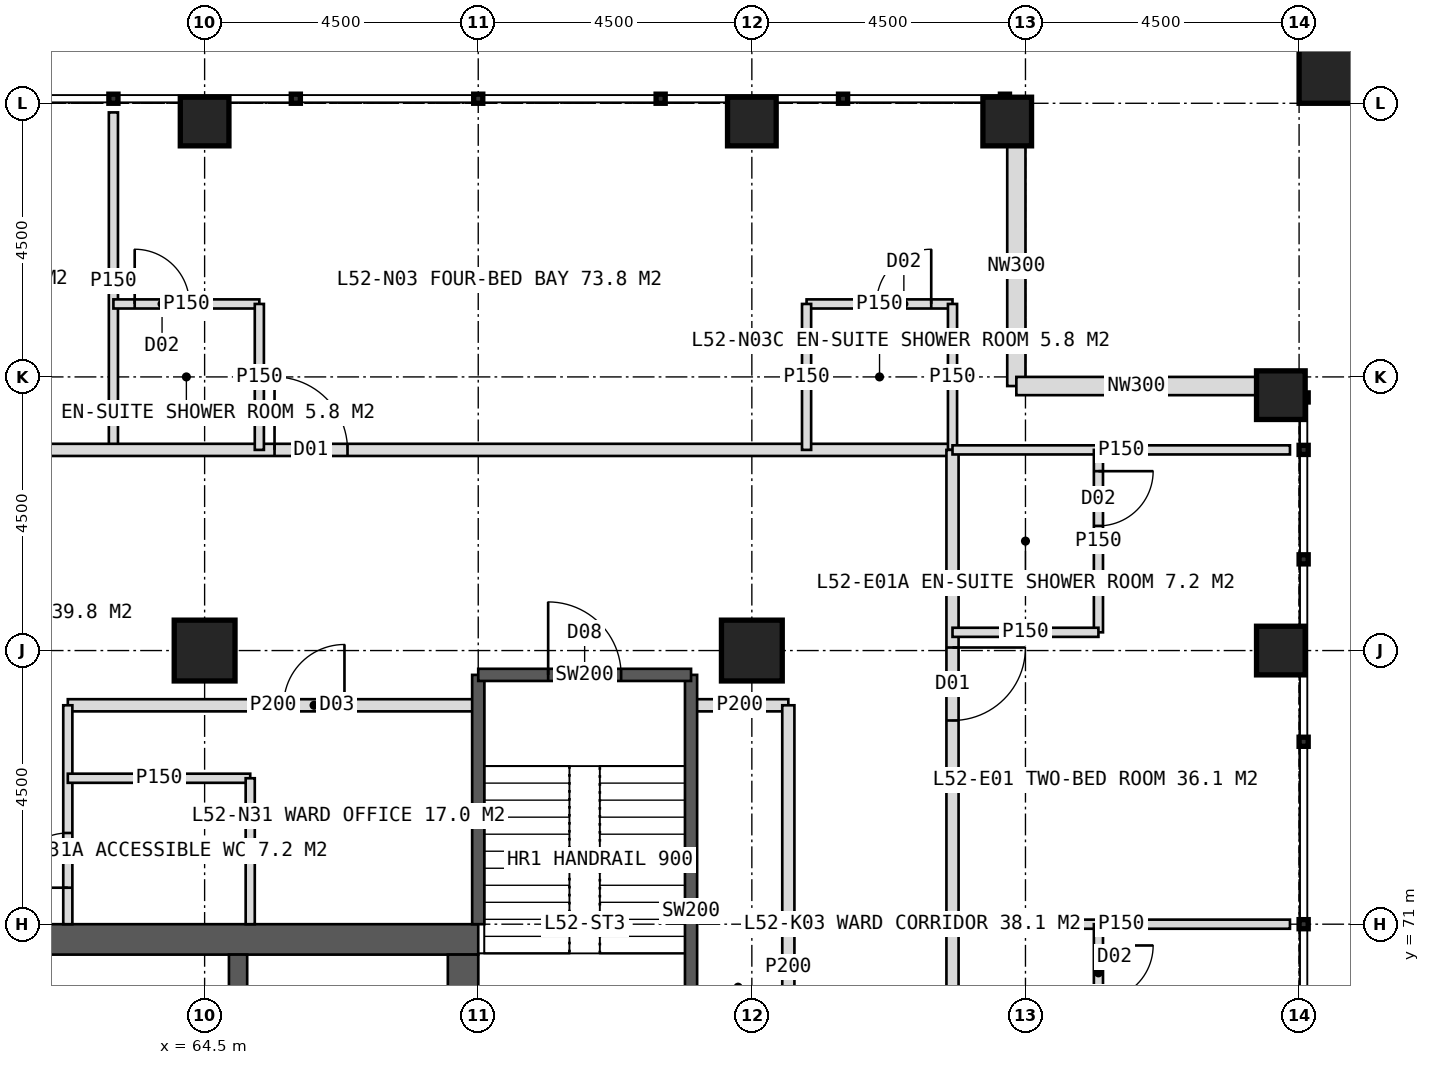
"""IFC4 building model, lengths in metres.
Left out: names, types, materials, properties, quantities, classifications, styles, units other than length and angle.
Written with IfcOpenShell. Run it as: python <this file> out.ifc"""

import sys

from ifc_helpers import new_model, si_unit, direction, frame, frame_2d, origin, origin_2d, place, context, subcontext, project, spatial, rectangle, hollow_rectangle, extrude, element, fill, save


model = new_model("IFC4")
c1 = context("Model", 3, precision=1e-05, world=origin(), true_north=direction((0.0, 1.0)))
c2 = subcontext(c1, "Body", "Model", "MODEL_VIEW")
j1 = project(units=[si_unit("LENGTHUNIT", "METRE"), si_unit("PLANEANGLEUNIT", "RADIAN")], contexts=[c1])
p1 = place(None, origin())
s1 = spatial("IfcSite", under=j1, at=p1, CompositionType="ELEMENT")
p2 = place(p1, origin())
s2 = spatial("IfcBuilding", under=s1, at=p2, CompositionType="ELEMENT")
p3 = place(p2, frame((0.0, 0.0, 217.0)))
s3 = spatial("IfcBuildingStorey", under=s2, at=p3, CompositionType="ELEMENT", Elevation=217.0)
p4 = place(p3, frame((51.0, 70.75, 0.0), z_axis=(0.0, 0.0, 1.0), x_axis=(1.0, 0.0, 0.0)))
e1 = element("IfcWall", 1, at=p4, inside=s3, PredefinedType="SHEAR", context=c2, shape_type="SweptSolid", body=[
    extrude(rectangle(XDim=18.0, YDim=0.5, at=frame_2d((9.0, 0.0))), origin(), (0.0, 0.0, 1.0), 4.0),
])
p5 = place(p4, frame((8.1, 0.0, 0.0)))
e2 = element("IfcOpeningElement", 2, at=p5, cuts=e1, PredefinedType="OPENING", context=c2, shape_type="SweptSolid", body=[
    extrude(rectangle(XDim=1.8, YDim=2.2, at=frame_2d((0.9, 1.1))), frame((0.0, 0.26, 0.0), z_axis=(0.0, -1.0, 0.0), x_axis=(1.0, 0.0, 0.0)), (0.0, 0.0, 1.0), 0.52),
])
p6 = place(p3, frame((68.75, 53.5, 0.0), z_axis=(0.0, 0.0, 1.0), x_axis=(0.0, 1.0, 0.0)))
e3 = element("IfcWall", 3, at=p6, inside=s3, PredefinedType="SHEAR", context=c2, shape_type="SweptSolid", body=[
    extrude(rectangle(XDim=17.0, YDim=0.5, at=frame_2d((8.5, 0.0))), origin(), (0.0, 0.0, 1.0), 4.0),
])
p7 = place(p6, frame((9.6, 0.0, 0.0)))
e4 = element("IfcOpeningElement", 4, at=p7, cuts=e3, PredefinedType="OPENING", context=c2, shape_type="SweptSolid", body=[
    extrude(rectangle(XDim=1.5, YDim=2.2, at=frame_2d((0.75, 1.1))), frame((0.0, 0.26, 0.0), z_axis=(0.0, -1.0, 0.0), x_axis=(1.0, 0.0, 0.0)), (0.0, 0.0, 1.0), 0.52),
])
p8 = place(p3, frame((65.05, 53.5, 0.0), z_axis=(0.0, 0.0, 1.0), x_axis=(0.0, 1.0, 0.0)))
e5 = element("IfcWall", 5, at=p8, inside=s3, PredefinedType="SHEAR", context=c2, shape_type="SweptSolid", body=[
    extrude(rectangle(XDim=17.0, YDim=0.3, at=frame_2d((8.5, 0.0))), origin(), (0.0, 0.0, 1.0), 4.0),
])
for number, where, z_axis, x_axis in (
    (6, (73.5, 75.5, 0.0), (0.0, 0.0, 1.0), (1.0, 0.0, 0.0)),
    (7, (64.5, 75.5, 0.0), (0.0, 0.0, 1.0), (1.0, 0.0, 0.0)),
):
    element("IfcColumn", number, at=place(p3, frame(where, z_axis=z_axis, x_axis=x_axis)), inside=s3, PredefinedType="COLUMN", context=c2, shape_type="SweptSolid", body=[
        extrude(hollow_rectangle(XDim=1.0, YDim=1.0, WallThickness=0.1, at=origin_2d()), origin(), (0.0, 0.0, 1.0), 4.0),
    ])
for number, where, z_axis, x_axis in (
    (8, (64.5, 84.2, 0.0), (0.0, 0.0, 1.0), (1.0, 0.0, 0.0)),
    (9, (73.5, 84.2, 0.0), (0.0, 0.0, 1.0), (1.0, 0.0, 0.0)),
    (10, (82.2, 75.5, 0.0), (0.0, 0.0, 1.0), (1.0, 0.0, 0.0)),
    (11, (77.7, 84.2, 0.0), (0.0, 0.0, 1.0), (1.0, 0.0, 0.0)),
    (12, (82.2, 79.7, 0.0), (0.0, 0.0, 1.0), (1.0, 0.0, 0.0)),
):
    element("IfcColumn", number, at=place(p3, frame(where, z_axis=z_axis, x_axis=x_axis)), inside=s3, PredefinedType="COLUMN", context=c2, shape_type="SweptSolid", body=[
        extrude(hollow_rectangle(XDim=0.8, YDim=0.8, WallThickness=0.08, at=origin_2d()), origin(), (0.0, 0.0, 1.0), 4.0),
    ])
p9 = place(p3, frame((83.1, 85.1, 0.0), z_axis=(0.0, 0.0, 1.0), x_axis=(1.0, 0.0, 0.0)))
e13 = element("IfcColumn", 13, at=p9, inside=s3, PredefinedType="COLUMN", context=c2, shape_type="SweptSolid", body=[
    extrude(hollow_rectangle(XDim=1.2, YDim=1.2, WallThickness=0.07, at=origin_2d()), origin(), (0.0, 0.0, 1.0), 4.0),
])
for number, where, z_axis, x_axis in (
    (14, (77.85, 83.8, 0.0), (0.0, 0.0, 1.0), (0.0, -1.0, 0.0)),
    (15, (77.85, 79.85, 0.0), (0.0, 0.0, 1.0), (1.0, 0.0, 0.0)),
):
    element("IfcWall", number, at=place(p3, frame(where, z_axis=z_axis, x_axis=x_axis)), inside=s3, PredefinedType="ELEMENTEDWALL", context=c2, shape_type="SweptSolid", body=[
        extrude(rectangle(XDim=3.95, YDim=0.3, at=frame_2d((1.975, 0.0))), origin(), (0.0, 0.0, 1.0), 2.85),
    ])
p10 = place(p3, frame((63.0, 78.8, 0.0), z_axis=(0.0, 0.0, 1.0), x_axis=(0.0, 1.0, 0.0)))
e16 = element("IfcWall", 16, at=p10, inside=s3, PredefinedType="PARTITIONING", context=c2, shape_type="SweptSolid", body=[
    extrude(rectangle(XDim=5.55, YDim=0.15, at=frame_2d((2.775, 0.0))), origin(), (0.0, 0.0, 1.0), 3.75),
])
p11 = place(p3, frame((43.2, 78.8, 0.0), z_axis=(0.0, 0.0, 1.0), x_axis=(1.0, 0.0, 0.0)))
e17 = element("IfcWall", 17, at=p11, inside=s3, PredefinedType="PARTITIONING", context=c2, shape_type="SweptSolid", body=[
    extrude(rectangle(XDim=33.6, YDim=0.2, at=frame_2d((16.8, 0.0))), origin(), (0.0, 0.0, 1.0), 3.75),
])
p12 = place(p11, frame((4.9, 0.0, 0.0)))
e18 = element("IfcOpeningElement", 18, at=p12, cuts=e17, PredefinedType="OPENING", context=c2, shape_type="SweptSolid", body=[
    extrude(rectangle(XDim=1.0, YDim=2.1, at=frame_2d((0.5, 1.05))), frame((0.0, 0.11, 0.0), z_axis=(0.0, -1.0, 0.0), x_axis=(1.0, 0.0, 0.0)), (0.0, 0.0, 1.0), 0.22),
])
p13 = place(p11, frame((14.05, 0.0, 0.0)))
e19 = element("IfcOpeningElement", 19, at=p13, cuts=e17, PredefinedType="OPENING", context=c2, shape_type="SweptSolid", body=[
    extrude(rectangle(XDim=1.2, YDim=2.2, at=frame_2d((0.6, 1.1))), frame((0.0, 0.11, 0.0), z_axis=(0.0, -1.0, 0.0), x_axis=(1.0, 0.0, 0.0)), (0.0, 0.0, 1.0), 0.22),
])
p14 = place(p11, frame((22.45, 0.0, 0.0)))
e20 = element("IfcOpeningElement", 20, at=p14, cuts=e17, PredefinedType="OPENING", context=c2, shape_type="SweptSolid", body=[
    extrude(rectangle(XDim=1.2, YDim=2.2, at=frame_2d((0.6, 1.1))), frame((0.0, 0.11, 0.0), z_axis=(0.0, -1.0, 0.0), x_axis=(1.0, 0.0, 0.0)), (0.0, 0.0, 1.0), 0.22),
])
p15 = place(p3, frame((63.0, 81.2, 0.0), z_axis=(0.0, 0.0, 1.0), x_axis=(1.0, 0.0, 0.0)))
e21 = element("IfcWall", 21, at=p15, inside=s3, PredefinedType="PARTITIONING", context=c2, shape_type="SweptSolid", body=[
    extrude(rectangle(XDim=2.4, YDim=0.15, at=frame_2d((1.2, 0.0))), origin(), (0.0, 0.0, 1.0), 3.75),
])
p16 = place(p15, frame((0.35, 0.0, 0.0)))
e22 = element("IfcOpeningElement", 22, at=p16, cuts=e21, PredefinedType="OPENING", context=c2, shape_type="SweptSolid", body=[
    extrude(rectangle(XDim=0.9, YDim=2.1, at=frame_2d((0.45, 1.05))), frame((0.0, 0.085, 0.0), z_axis=(0.0, -1.0, 0.0), x_axis=(1.0, 0.0, 0.0)), (0.0, 0.0, 1.0), 0.17),
])
p17 = place(p3, frame((65.4, 78.8, 0.0), z_axis=(0.0, 0.0, 1.0), x_axis=(0.0, 1.0, 0.0)))
e23 = element("IfcWall", 23, at=p17, inside=s3, PredefinedType="PARTITIONING", context=c2, shape_type="SweptSolid", body=[
    extrude(rectangle(XDim=2.4, YDim=0.15, at=frame_2d((1.2, 0.0))), origin(), (0.0, 0.0, 1.0), 3.75),
])
p18 = place(p3, frame((74.4, 81.2, 0.0), z_axis=(0.0, 0.0, 1.0), x_axis=(1.0, 0.0, 0.0)))
e24 = element("IfcWall", 24, at=p18, inside=s3, PredefinedType="PARTITIONING", context=c2, shape_type="SweptSolid", body=[
    extrude(rectangle(XDim=2.4, YDim=0.15, at=frame_2d((1.2, 0.0))), origin(), (0.0, 0.0, 1.0), 3.75),
])
p19 = place(p18, frame((1.15, 0.0, 0.0)))
e25 = element("IfcOpeningElement", 25, at=p19, cuts=e24, PredefinedType="OPENING", context=c2, shape_type="SweptSolid", body=[
    extrude(rectangle(XDim=0.9, YDim=2.1, at=frame_2d((0.45, 1.05))), frame((0.0, 0.085, 0.0), z_axis=(0.0, -1.0, 0.0), x_axis=(1.0, 0.0, 0.0)), (0.0, 0.0, 1.0), 0.17),
])
for number, where, z_axis, x_axis in (
    (26, (74.4, 78.8, 0.0), (0.0, 0.0, 1.0), (0.0, 1.0, 0.0)),
    (27, (76.8, 78.8, 0.0), (0.0, 0.0, 1.0), (0.0, 1.0, 0.0)),
):
    element("IfcWall", number, at=place(p3, frame(where, z_axis=z_axis, x_axis=x_axis)), inside=s3, PredefinedType="PARTITIONING", context=c2, shape_type="SweptSolid", body=[
        extrude(rectangle(XDim=2.4, YDim=0.15, at=frame_2d((1.2, 0.0))), origin(), (0.0, 0.0, 1.0), 3.75),
    ])
p20 = place(p3, frame((62.25, 74.6, 0.0), z_axis=(0.0, 0.0, 1.0), x_axis=(1.0, 0.0, 0.0)))
e28 = element("IfcWall", 28, at=p20, inside=s3, PredefinedType="PARTITIONING", context=c2, shape_type="SweptSolid", body=[
    extrude(rectangle(XDim=6.75, YDim=0.2, at=frame_2d((3.375, 0.0))), origin(), (0.0, 0.0, 1.0), 3.75),
])
p21 = place(p20, frame((3.55, 0.0, 0.0)))
e29 = element("IfcOpeningElement", 29, at=p21, cuts=e28, PredefinedType="OPENING", context=c2, shape_type="SweptSolid", body=[
    extrude(rectangle(XDim=1.0, YDim=2.1, at=frame_2d((0.5, 1.05))), frame((0.0, 0.11, 0.0), z_axis=(0.0, -1.0, 0.0), x_axis=(1.0, 0.0, 0.0)), (0.0, 0.0, 1.0), 0.22),
])
p22 = place(p3, frame((72.5, 74.6, 0.0), z_axis=(0.0, 0.0, 1.0), x_axis=(1.0, 0.0, 0.0)))
e30 = element("IfcWall", 30, at=p22, inside=s3, PredefinedType="PARTITIONING", context=c2, shape_type="SweptSolid", body=[
    extrude(rectangle(XDim=1.6, YDim=0.2, at=frame_2d((0.8, 0.0))), origin(), (0.0, 0.0, 1.0), 3.75),
])
p23 = place(p3, frame((62.25, 71.0, 0.0), z_axis=(0.0, 0.0, 1.0), x_axis=(0.0, 1.0, 0.0)))
e31 = element("IfcWall", 31, at=p23, inside=s3, PredefinedType="PARTITIONING", context=c2, shape_type="SweptSolid", body=[
    extrude(rectangle(XDim=3.6, YDim=0.15, at=frame_2d((1.8, 0.0))), origin(), (0.0, 0.0, 1.0), 3.75),
])
p24 = place(p23, frame((0.6, 0.0, 0.0)))
e32 = element("IfcOpeningElement", 32, at=p24, cuts=e31, PredefinedType="OPENING", context=c2, shape_type="SweptSolid", body=[
    extrude(rectangle(XDim=0.9, YDim=2.1, at=frame_2d((0.45, 1.05))), frame((0.0, 0.085, 0.0), z_axis=(0.0, -1.0, 0.0), x_axis=(1.0, 0.0, 0.0)), (0.0, 0.0, 1.0), 0.17),
])
p25 = place(p3, frame((62.25, 73.4, 0.0), z_axis=(0.0, 0.0, 1.0), x_axis=(1.0, 0.0, 0.0)))
e33 = element("IfcWall", 33, at=p25, inside=s3, PredefinedType="PARTITIONING", context=c2, shape_type="SweptSolid", body=[
    extrude(rectangle(XDim=3.0, YDim=0.15, at=frame_2d((1.5, 0.0))), origin(), (0.0, 0.0, 1.0), 3.75),
])
p26 = place(p3, frame((65.25, 71.0, 0.0), z_axis=(0.0, 0.0, 1.0), x_axis=(0.0, 1.0, 0.0)))
e34 = element("IfcWall", 34, at=p26, inside=s3, PredefinedType="PARTITIONING", context=c2, shape_type="SweptSolid", body=[
    extrude(rectangle(XDim=2.4, YDim=0.15, at=frame_2d((1.2, 0.0))), origin(), (0.0, 0.0, 1.0), 3.75),
])
p27 = place(p3, frame((76.8, 71.0, 0.0), z_axis=(0.0, 0.0, 1.0), x_axis=(1.0, 0.0, 0.0)))
e35 = element("IfcWall", 35, at=p27, inside=s3, PredefinedType="PARTITIONING", context=c2, shape_type="SweptSolid", body=[
    extrude(rectangle(XDim=5.55, YDim=0.15, at=frame_2d((2.775, 0.0))), origin(), (0.0, 0.0, 1.0), 3.75),
])
p28 = place(p3, frame((76.8, 78.8, 0.0), z_axis=(0.0, 0.0, 1.0), x_axis=(0.0, -1.0, 0.0)))
e36 = element("IfcWall", 36, at=p28, inside=s3, PredefinedType="PARTITIONING", context=c2, shape_type="SweptSolid", body=[
    extrude(rectangle(XDim=33.6, YDim=0.2, at=frame_2d((16.8, 0.0))), origin(), (0.0, 0.0, 1.0), 3.75),
])
p29 = place(p28, frame((3.25, 0.0, 0.0)))
e37 = element("IfcOpeningElement", 37, at=p29, cuts=e36, PredefinedType="OPENING", context=c2, shape_type="SweptSolid", body=[
    extrude(rectangle(XDim=1.2, YDim=2.2, at=frame_2d((0.6, 1.1))), frame((0.0, 0.11, 0.0), z_axis=(0.0, -1.0, 0.0), x_axis=(1.0, 0.0, 0.0)), (0.0, 0.0, 1.0), 0.22),
])
p30 = place(p28, frame((10.45, 0.0, 0.0)))
e38 = element("IfcOpeningElement", 38, at=p30, cuts=e36, PredefinedType="OPENING", context=c2, shape_type="SweptSolid", body=[
    extrude(rectangle(XDim=1.2, YDim=2.2, at=frame_2d((0.6, 1.1))), frame((0.0, 0.11, 0.0), z_axis=(0.0, -1.0, 0.0), x_axis=(1.0, 0.0, 0.0)), (0.0, 0.0, 1.0), 0.22),
])
p31 = place(p28, frame((14.8, 0.0, 0.0)))
e39 = element("IfcOpeningElement", 39, at=p31, cuts=e36, PredefinedType="OPENING", context=c2, shape_type="SweptSolid", body=[
    extrude(rectangle(XDim=1.0, YDim=2.1, at=frame_2d((0.5, 1.05))), frame((0.0, 0.11, 0.0), z_axis=(0.0, -1.0, 0.0), x_axis=(1.0, 0.0, 0.0)), (0.0, 0.0, 1.0), 0.22),
])
p32 = place(p28, frame((20.05, 0.0, 0.0)))
e40 = element("IfcOpeningElement", 40, at=p32, cuts=e36, PredefinedType="OPENING", context=c2, shape_type="SweptSolid", body=[
    extrude(rectangle(XDim=1.2, YDim=2.2, at=frame_2d((0.6, 1.1))), frame((0.0, 0.11, 0.0), z_axis=(0.0, -1.0, 0.0), x_axis=(1.0, 0.0, 0.0)), (0.0, 0.0, 1.0), 0.22),
])
p33 = place(p28, frame((26.95, 0.0, 0.0)))
e41 = element("IfcOpeningElement", 41, at=p33, cuts=e36, PredefinedType="OPENING", context=c2, shape_type="SweptSolid", body=[
    extrude(rectangle(XDim=1.2, YDim=2.2, at=frame_2d((0.6, 1.1))), frame((0.0, 0.11, 0.0), z_axis=(0.0, -1.0, 0.0), x_axis=(1.0, 0.0, 0.0)), (0.0, 0.0, 1.0), 0.22),
])
p34 = place(p3, frame((76.8, 78.8, 0.0), z_axis=(0.0, 0.0, 1.0), x_axis=(1.0, 0.0, 0.0)))
e42 = element("IfcWall", 42, at=p34, inside=s3, PredefinedType="PARTITIONING", context=c2, shape_type="SweptSolid", body=[
    extrude(rectangle(XDim=5.55, YDim=0.15, at=frame_2d((2.775, 0.0))), origin(), (0.0, 0.0, 1.0), 3.75),
])
p35 = place(p3, frame((79.2, 78.8, 0.0), z_axis=(0.0, 0.0, 1.0), x_axis=(0.0, -1.0, 0.0)))
e43 = element("IfcWall", 43, at=p35, inside=s3, PredefinedType="PARTITIONING", context=c2, shape_type="SweptSolid", body=[
    extrude(rectangle(XDim=3.0, YDim=0.15, at=frame_2d((1.5, 0.0))), origin(), (0.0, 0.0, 1.0), 3.75),
])
p36 = place(p35, frame((0.35, 0.0, 0.0)))
e44 = element("IfcOpeningElement", 44, at=p36, cuts=e43, PredefinedType="OPENING", context=c2, shape_type="SweptSolid", body=[
    extrude(rectangle(XDim=0.9, YDim=2.1, at=frame_2d((0.45, 1.05))), frame((0.0, 0.085, 0.0), z_axis=(0.0, -1.0, 0.0), x_axis=(1.0, 0.0, 0.0)), (0.0, 0.0, 1.0), 0.17),
])
p37 = place(p3, frame((76.8, 75.8, 0.0), z_axis=(0.0, 0.0, 1.0), x_axis=(1.0, 0.0, 0.0)))
e45 = element("IfcWall", 45, at=p37, inside=s3, PredefinedType="PARTITIONING", context=c2, shape_type="SweptSolid", body=[
    extrude(rectangle(XDim=2.4, YDim=0.15, at=frame_2d((1.2, 0.0))), origin(), (0.0, 0.0, 1.0), 3.75),
])
p38 = place(p3, frame((79.2, 71.0, 0.0), z_axis=(0.0, 0.0, 1.0), x_axis=(0.0, -1.0, 0.0)))
e46 = element("IfcWall", 46, at=p38, inside=s3, PredefinedType="PARTITIONING", context=c2, shape_type="SweptSolid", body=[
    extrude(rectangle(XDim=2.4, YDim=0.15, at=frame_2d((1.2, 0.0))), origin(), (0.0, 0.0, 1.0), 3.75),
])
p39 = place(p38, frame((0.35, 0.0, 0.0)))
e47 = element("IfcOpeningElement", 47, at=p39, cuts=e46, PredefinedType="OPENING", context=c2, shape_type="SweptSolid", body=[
    extrude(rectangle(XDim=0.9, YDim=2.1, at=frame_2d((0.45, 1.05))), frame((0.0, 0.085, 0.0), z_axis=(0.0, -1.0, 0.0), x_axis=(1.0, 0.0, 0.0)), (0.0, 0.0, 1.0), 0.17),
])
p40 = place(p3, frame((74.1, 74.6, 0.0), z_axis=(0.0, 0.0, 1.0), x_axis=(0.0, -1.0, 0.0)))
e48 = element("IfcWall", 48, at=p40, inside=s3, PredefinedType="PARTITIONING", context=c2, shape_type="SweptSolid", body=[
    extrude(rectangle(XDim=8.6, YDim=0.2, at=frame_2d((4.3, 0.0))), origin(), (0.0, 0.0, 1.0), 3.75),
])
p41 = place(p40, frame((5.6, 0.0, 0.0)))
e49 = element("IfcOpeningElement", 49, at=p41, cuts=e48, PredefinedType="OPENING", context=c2, shape_type="SweptSolid", body=[
    extrude(rectangle(XDim=1.0, YDim=2.1, at=frame_2d((0.5, 1.05))), frame((0.0, 0.11, 0.0), z_axis=(0.0, -1.0, 0.0), x_axis=(1.0, 0.0, 0.0)), (0.0, 0.0, 1.0), 0.22),
])
p42 = place(p3, frame((69.0, 71.0, 0.0), z_axis=(0.0, 0.0, 1.0), x_axis=(0.0, 1.0, 0.0)))
e50 = element("IfcWall", 50, at=p42, inside=s3, PredefinedType="SOLIDWALL", context=c2, shape_type="SweptSolid", body=[
    extrude(rectangle(XDim=4.1, YDim=0.2, at=frame_2d((2.05, 0.0))), origin(), (0.0, 0.0, 1.0), 3.75),
])
p43 = place(p3, frame((72.5, 67.35, 0.0), z_axis=(0.0, 0.0, 1.0), x_axis=(0.0, 1.0, 0.0)))
e51 = element("IfcWall", 51, at=p43, inside=s3, PredefinedType="SOLIDWALL", context=c2, shape_type="SweptSolid", body=[
    extrude(rectangle(XDim=7.75, YDim=0.2, at=frame_2d((3.875, 0.0))), origin(), (0.0, 0.0, 1.0), 3.75),
])
p44 = place(p3, frame((69.0, 75.1, 0.0), z_axis=(0.0, 0.0, 1.0), x_axis=(1.0, 0.0, 0.0)))
e52 = element("IfcWall", 52, at=p44, inside=s3, PredefinedType="SOLIDWALL", context=c2, shape_type="SweptSolid", body=[
    extrude(rectangle(XDim=3.5, YDim=0.2, at=frame_2d((1.75, 0.0))), origin(), (0.0, 0.0, 1.0), 3.75),
])
p45 = place(p44, frame((1.15, 0.0, 0.0)))
e53 = element("IfcOpeningElement", 53, at=p45, cuts=e52, PredefinedType="OPENING", context=c2, shape_type="SweptSolid", body=[
    extrude(rectangle(XDim=1.2, YDim=2.1, at=frame_2d((0.6, 1.05))), frame((0.0, 0.11, 0.0), z_axis=(0.0, -1.0, 0.0), x_axis=(1.0, 0.0, 0.0)), (0.0, 0.0, 1.0), 0.22),
])
p46 = place(p14, origin())
e54 = element("IfcDoor", 54, at=p46, inside=s3, OperationType="SINGLE_SWING_LEFT", PredefinedType="DOOR", context=c2, shape_type="SweptSolid", body=[
    extrude(rectangle(XDim=1.2, YDim=2.2, at=frame_2d((0.6, 1.1))), frame((0.0, 0.025, 0.0), z_axis=(0.0, -1.0, 0.0), x_axis=(1.0, 0.0, 0.0)), (0.0, 0.0, 1.0), 0.05),
])
fill(e20, e54)
p47 = place(p16, origin())
e55 = element("IfcDoor", 55, at=p47, inside=s3, OperationType="SINGLE_SWING_LEFT", PredefinedType="DOOR", context=c2, shape_type="SweptSolid", body=[
    extrude(rectangle(XDim=0.9, YDim=2.1, at=frame_2d((0.45, 1.05))), frame((0.0, 0.025, 0.0), z_axis=(0.0, -1.0, 0.0), x_axis=(1.0, 0.0, 0.0)), (0.0, 0.0, 1.0), 0.05),
])
fill(e22, e55)
p48 = place(p19, origin())
e56 = element("IfcDoor", 56, at=p48, inside=s3, OperationType="SINGLE_SWING_RIGHT", PredefinedType="DOOR", context=c2, shape_type="SweptSolid", body=[
    extrude(rectangle(XDim=0.9, YDim=2.1, at=frame_2d((0.45, 1.05))), frame((0.0, 0.025, 0.0), z_axis=(0.0, -1.0, 0.0), x_axis=(1.0, 0.0, 0.0)), (0.0, 0.0, 1.0), 0.05),
])
fill(e25, e56)
p49 = place(p24, origin())
e57 = element("IfcDoor", 57, at=p49, inside=s3, OperationType="SINGLE_SWING_LEFT", PredefinedType="DOOR", context=c2, shape_type="SweptSolid", body=[
    extrude(rectangle(XDim=0.9, YDim=2.1, at=frame_2d((0.45, 1.05))), frame((0.0, 0.025, 0.0), z_axis=(0.0, -1.0, 0.0), x_axis=(1.0, 0.0, 0.0)), (0.0, 0.0, 1.0), 0.05),
])
fill(e32, e57)
p50 = place(p21, origin())
e58 = element("IfcDoor", 58, at=p50, inside=s3, OperationType="SINGLE_SWING_RIGHT", PredefinedType="DOOR", context=c2, shape_type="SweptSolid", body=[
    extrude(rectangle(XDim=1.0, YDim=2.1, at=frame_2d((0.5, 1.05))), frame((0.0, 0.025, 0.0), z_axis=(0.0, -1.0, 0.0), x_axis=(1.0, 0.0, 0.0)), (0.0, 0.0, 1.0), 0.05),
])
fill(e29, e58)
p51 = place(p29, origin())
e59 = element("IfcDoor", 59, at=p51, inside=s3, OperationType="SINGLE_SWING_LEFT", PredefinedType="DOOR", context=c2, shape_type="SweptSolid", body=[
    extrude(rectangle(XDim=1.2, YDim=2.2, at=frame_2d((0.6, 1.1))), frame((0.0, 0.025, 0.0), z_axis=(0.0, -1.0, 0.0), x_axis=(1.0, 0.0, 0.0)), (0.0, 0.0, 1.0), 0.05),
])
fill(e37, e59)
p52 = place(p36, origin())
e60 = element("IfcDoor", 60, at=p52, inside=s3, OperationType="SINGLE_SWING_LEFT", PredefinedType="DOOR", context=c2, shape_type="SweptSolid", body=[
    extrude(rectangle(XDim=0.9, YDim=2.1, at=frame_2d((0.45, 1.05))), frame((0.0, 0.025, 0.0), z_axis=(0.0, -1.0, 0.0), x_axis=(1.0, 0.0, 0.0)), (0.0, 0.0, 1.0), 0.05),
])
fill(e44, e60)
p53 = place(p39, origin())
e61 = element("IfcDoor", 61, at=p53, inside=s3, OperationType="SINGLE_SWING_LEFT", PredefinedType="DOOR", context=c2, shape_type="SweptSolid", body=[
    extrude(rectangle(XDim=0.9, YDim=2.1, at=frame_2d((0.45, 1.05))), frame((0.0, 0.025, 0.0), z_axis=(0.0, -1.0, 0.0), x_axis=(1.0, 0.0, 0.0)), (0.0, 0.0, 1.0), 0.05),
])
fill(e47, e61)
p54 = place(p45, origin())
e62 = element("IfcDoor", 62, at=p54, inside=s3, OperationType="SINGLE_SWING_LEFT", PredefinedType="DOOR", context=c2, shape_type="SweptSolid", body=[
    extrude(rectangle(XDim=1.2, YDim=2.1, at=frame_2d((0.6, 1.05))), frame((0.0, 0.025, 0.0), z_axis=(0.0, -1.0, 0.0), x_axis=(1.0, 0.0, 0.0)), (0.0, 0.0, 1.0), 0.05),
])
fill(e53, e62)
save(model, sys.argv[1])
